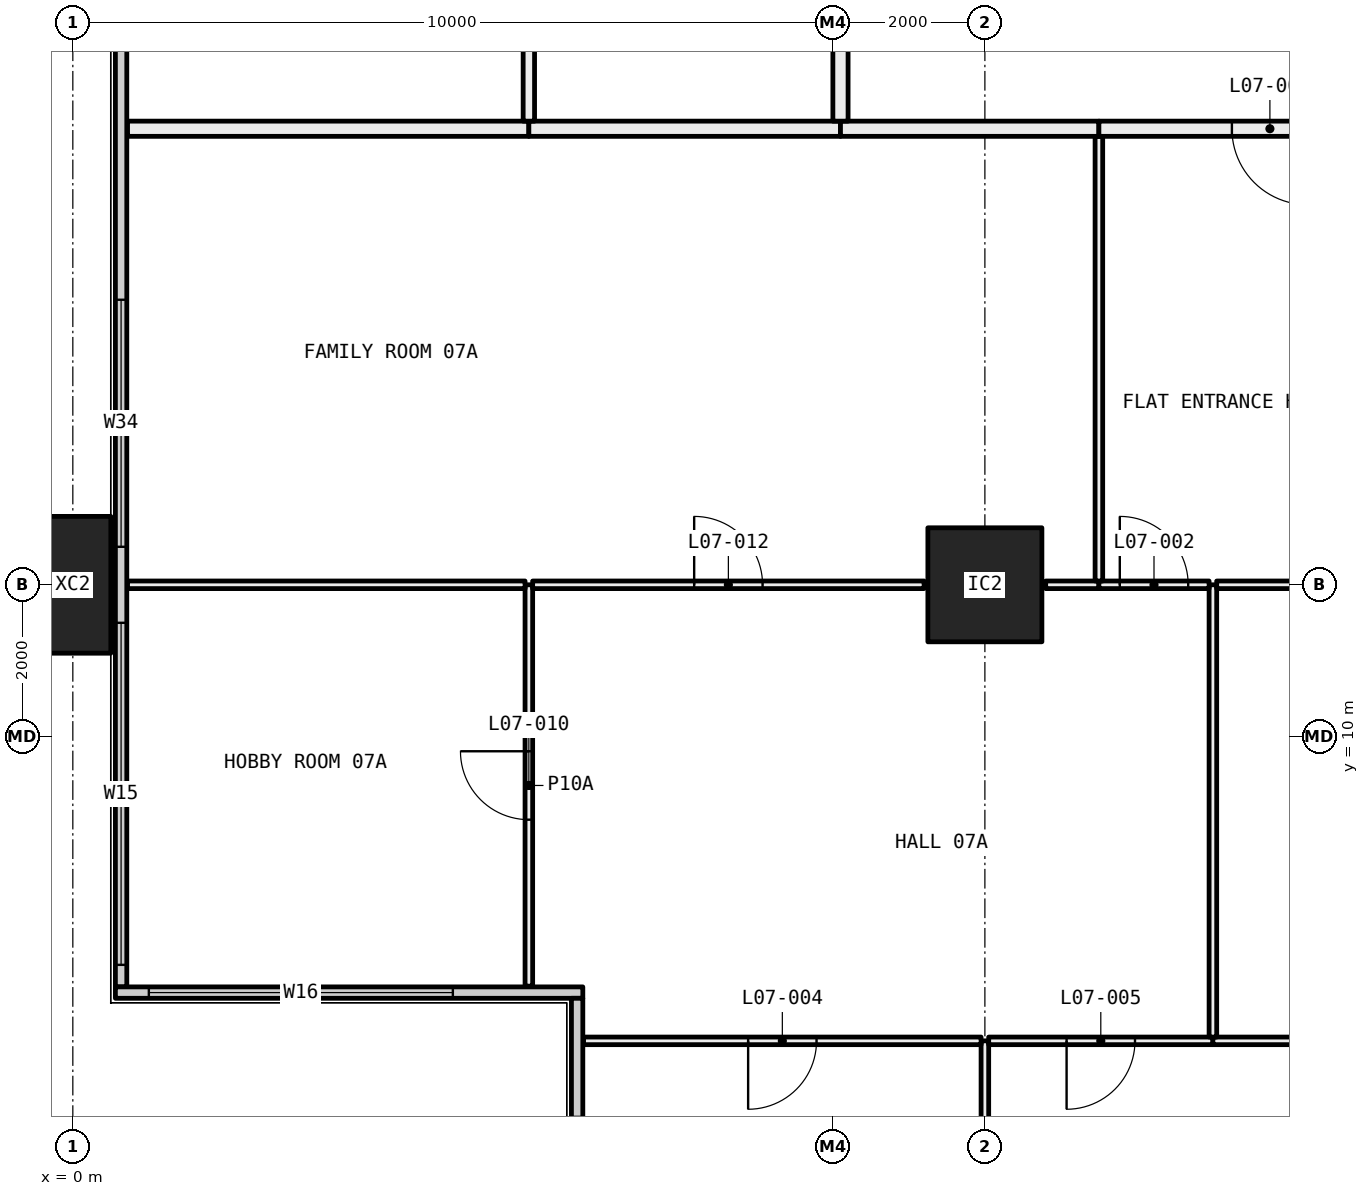
"""IFC4 building model, lengths in metres.
Left out: names, types, materials, properties, quantities, classifications, styles, units other than length and angle.
Written with IfcOpenShell. Run it as: python <this file> out.ifc"""

import sys

from ifc_helpers import new_model, si_unit, direction, frame, frame_2d, origin, origin_2d, place, context, subcontext, project, spatial, rectangle, hollow_rectangle, extrude, element, fill, save


model = new_model("IFC4")
c1 = context("Model", 3, precision=1e-05, world=origin(), true_north=direction((0.0, 1.0)))
c2 = subcontext(c1, "Body", "Model", "MODEL_VIEW")
j1 = project(units=[si_unit("LENGTHUNIT", "METRE"), si_unit("PLANEANGLEUNIT", "RADIAN")], contexts=[c1])
p1 = place(None, origin())
s1 = spatial("IfcSite", under=j1, at=p1, CompositionType="ELEMENT")
p2 = place(p1, origin())
s2 = spatial("IfcBuilding", under=s1, at=p2, CompositionType="ELEMENT")
p3 = place(p2, frame((0.0, 0.0, 36.9)))
s3 = spatial("IfcBuildingStorey", under=s2, at=p3, CompositionType="ELEMENT", Elevation=36.9)
p4 = place(p3, frame((0.0, 12.0, -0.4), z_axis=(0.0, 0.0, 1.0), x_axis=(0.0, 1.0, 0.0)))
e1 = element("IfcColumn", 1, at=p4, inside=s3, PredefinedType="COLUMN", context=c2, shape_type="SweptSolid", body=[
    extrude(hollow_rectangle(XDim=1.8, YDim=1.0, WallThickness=0.07, at=origin_2d()), origin(), (0.0, 0.0, 1.0), 3.45),
])
p5 = place(p3, frame((12.0, 12.0, 0.0), z_axis=(0.0, 0.0, 1.0), x_axis=(1.0, 0.0, 0.0)))
e2 = element("IfcColumn", 2, at=p5, inside=s3, PredefinedType="COLUMN", context=c2, shape_type="SweptSolid", body=[
    extrude(hollow_rectangle(XDim=1.5, YDim=1.5, WallThickness=0.065, at=origin_2d()), origin(), (0.0, 0.0, 1.0), 3.05),
])
p6 = place(p3, frame((0.635, 6.71, 0.0), z_axis=(0.0, 0.0, 1.0), x_axis=(0.0, 1.0, 0.0)))
e3 = element("IfcWall", 3, at=p6, inside=s3, PredefinedType="ELEMENTEDWALL", context=c2, shape_type="SweptSolid", body=[
    extrude(rectangle(XDim=34.58, YDim=0.15, at=frame_2d((17.29, 0.0))), origin(), (0.0, 0.0, 1.0), 3.05),
])
p7 = place(p6, frame((0.29, 0.0, 0.45)))
e4 = element("IfcOpeningElement", 4, at=p7, cuts=e3, PredefinedType="OPENING", context=c2, shape_type="SweptSolid", body=[
    extrude(rectangle(XDim=4.5, YDim=2.55, at=frame_2d((2.25, 1.275))), frame((0.0, 0.085, 0.0), z_axis=(0.0, -1.0, 0.0), x_axis=(1.0, 0.0, 0.0)), (0.0, 0.0, 1.0), 0.17),
])
p8 = place(p6, frame((5.79, 0.0, 0.45)))
e5 = element("IfcOpeningElement", 5, at=p8, cuts=e3, PredefinedType="OPENING", context=c2, shape_type="SweptSolid", body=[
    extrude(rectangle(XDim=3.25, YDim=2.55, at=frame_2d((1.625, 1.275))), frame((0.0, 0.085, 0.0), z_axis=(0.0, -1.0, 0.0), x_axis=(1.0, 0.0, 0.0)), (0.0, 0.0, 1.0), 0.17),
])
p9 = place(p6, frame((13.54, 0.0, 0.45)))
e6 = element("IfcOpeningElement", 6, at=p9, cuts=e3, PredefinedType="OPENING", context=c2, shape_type="SweptSolid", body=[
    extrude(rectangle(XDim=3.25, YDim=2.55, at=frame_2d((1.625, 1.275))), frame((0.0, 0.085, 0.0), z_axis=(0.0, -1.0, 0.0), x_axis=(1.0, 0.0, 0.0)), (0.0, 0.0, 1.0), 0.17),
])
p10 = place(p6, frame((17.79, 0.0, 0.45)))
e7 = element("IfcOpeningElement", 7, at=p10, cuts=e3, PredefinedType="OPENING", context=c2, shape_type="SweptSolid", body=[
    extrude(rectangle(XDim=3.25, YDim=2.55, at=frame_2d((1.625, 1.275))), frame((0.0, 0.085, 0.0), z_axis=(0.0, -1.0, 0.0), x_axis=(1.0, 0.0, 0.0)), (0.0, 0.0, 1.0), 0.17),
])
p11 = place(p6, frame((26.79, 0.0, 0.45)))
e8 = element("IfcOpeningElement", 8, at=p11, cuts=e3, PredefinedType="OPENING", context=c2, shape_type="SweptSolid", body=[
    extrude(rectangle(XDim=2.0, YDim=2.55, at=frame_2d((1.0, 1.275))), frame((0.0, 0.085, 0.0), z_axis=(0.0, -1.0, 0.0), x_axis=(1.0, 0.0, 0.0)), (0.0, 0.0, 1.0), 0.17),
])
p12 = place(p6, frame((29.79, 0.0, 0.45)))
e9 = element("IfcOpeningElement", 9, at=p12, cuts=e3, PredefinedType="OPENING", context=c2, shape_type="SweptSolid", body=[
    extrude(rectangle(XDim=4.5, YDim=2.55, at=frame_2d((2.25, 1.275))), frame((0.0, 0.085, 0.0), z_axis=(0.0, -1.0, 0.0), x_axis=(1.0, 0.0, 0.0)), (0.0, 0.0, 1.0), 0.17),
])
p13 = place(p3, frame((0.56, 6.635, 0.0), z_axis=(0.0, 0.0, 1.0), x_axis=(1.0, 0.0, 0.0)))
e10 = element("IfcWall", 10, at=p13, inside=s3, PredefinedType="ELEMENTEDWALL", context=c2, shape_type="SweptSolid", body=[
    extrude(rectangle(XDim=6.15, YDim=0.15, at=frame_2d((3.075, 0.0))), origin(), (0.0, 0.0, 1.0), 3.05),
])
p14 = place(p13, frame((0.44, 0.0, 0.45)))
e11 = element("IfcOpeningElement", 11, at=p14, cuts=e10, PredefinedType="OPENING", context=c2, shape_type="SweptSolid", body=[
    extrude(rectangle(XDim=4.0, YDim=2.55, at=frame_2d((2.0, 1.275))), frame((0.0, 0.085, 0.0), z_axis=(0.0, -1.0, 0.0), x_axis=(1.0, 0.0, 0.0)), (0.0, 0.0, 1.0), 0.17),
])
p15 = place(p3, frame((6.635, 0.71, 0.0), z_axis=(0.0, 0.0, 1.0), x_axis=(0.0, 1.0, 0.0)))
e12 = element("IfcWall", 12, at=p15, inside=s3, PredefinedType="ELEMENTEDWALL", context=c2, shape_type="SweptSolid", body=[
    extrude(rectangle(XDim=5.85, YDim=0.15, at=frame_2d((2.925, 0.0))), origin(), (0.0, 0.0, 1.0), 3.05),
])
p16 = place(p15, frame((0.29, 0.0, 0.45)))
e13 = element("IfcOpeningElement", 13, at=p16, cuts=e12, PredefinedType="OPENING", context=c2, shape_type="SweptSolid", body=[
    extrude(rectangle(XDim=4.0, YDim=2.55, at=frame_2d((2.0, 1.275))), frame((0.0, 0.085, 0.0), z_axis=(0.0, -1.0, 0.0), x_axis=(1.0, 0.0, 0.0)), (0.0, 0.0, 1.0), 0.17),
])
p17 = place(p3, frame((12.0, 0.72, 0.0), z_axis=(0.0, 0.0, 1.0), x_axis=(0.0, 1.0, 0.0)))
e14 = element("IfcWall", 14, at=p17, inside=s3, PredefinedType="PARTITIONING", context=c2, shape_type="SweptSolid", body=[
    extrude(rectangle(XDim=5.28, YDim=0.1, at=frame_2d((2.64, 0.0))), origin(), (0.0, 0.0, 1.0), 2.45),
])
p18 = place(p3, frame((11.95, 6.0, 0.0), z_axis=(0.0, 0.0, 1.0), x_axis=(-1.0, 0.0, 0.0)))
e15 = element("IfcWall", 15, at=p18, inside=s3, PredefinedType="PARTITIONING", context=c2, shape_type="SweptSolid", body=[
    extrude(rectangle(XDim=5.23, YDim=0.1, at=frame_2d((2.615, 0.0))), origin(), (0.0, 0.0, 1.0), 2.45),
])
p19 = place(p18, frame((2.165, 0.0, 0.0)))
e16 = element("IfcOpeningElement", 16, at=p19, cuts=e15, PredefinedType="OPENING", context=c2, shape_type="SweptSolid", body=[
    extrude(rectangle(XDim=0.9, YDim=2.1, at=frame_2d((0.45, 1.05))), frame((0.0, 0.06, 0.0), z_axis=(0.0, -1.0, 0.0), x_axis=(1.0, 0.0, 0.0)), (0.0, 0.0, 1.0), 0.12),
])
p20 = place(p3, frame((15.0, 6.0, 0.0), z_axis=(0.0, 0.0, 1.0), x_axis=(-1.0, 0.0, 0.0)))
e17 = element("IfcWall", 17, at=p20, inside=s3, PredefinedType="PARTITIONING", context=c2, shape_type="SweptSolid", body=[
    extrude(rectangle(XDim=2.95, YDim=0.1, at=frame_2d((1.475, 0.0))), origin(), (0.0, 0.0, 1.0), 2.45),
])
p21 = place(p20, frame((1.025, 0.0, 0.0)))
e18 = element("IfcOpeningElement", 18, at=p21, cuts=e17, PredefinedType="OPENING", context=c2, shape_type="SweptSolid", body=[
    extrude(rectangle(XDim=0.9, YDim=2.1, at=frame_2d((0.45, 1.05))), frame((0.0, 0.06, 0.0), z_axis=(0.0, -1.0, 0.0), x_axis=(1.0, 0.0, 0.0)), (0.0, 0.0, 1.0), 0.12),
])
p22 = place(p3, frame((17.95, 6.0, 0.0), z_axis=(0.0, 0.0, 1.0), x_axis=(-1.0, 0.0, 0.0)))
e19 = element("IfcWall", 19, at=p22, inside=s3, PredefinedType="PARTITIONING", context=c2, shape_type="SweptSolid", body=[
    extrude(rectangle(XDim=2.95, YDim=0.1, at=frame_2d((1.475, 0.0))), origin(), (0.0, 0.0, 1.0), 3.05),
])
p23 = place(p3, frame((6.0, 6.72, 0.0), z_axis=(0.0, 0.0, 1.0), x_axis=(0.0, 1.0, 0.0)))
e20 = element("IfcWall", 20, at=p23, inside=s3, PredefinedType="PARTITIONING", context=c2, shape_type="SweptSolid", body=[
    extrude(rectangle(XDim=5.28, YDim=0.1, at=frame_2d((2.64, 0.0))), origin(), (0.0, 0.0, 1.0), 2.45),
])
p24 = place(p23, frame((2.19, 0.0, 0.0)))
e21 = element("IfcOpeningElement", 21, at=p24, cuts=e20, PredefinedType="OPENING", context=c2, shape_type="SweptSolid", body=[
    extrude(rectangle(XDim=0.9, YDim=2.1, at=frame_2d((0.45, 1.05))), frame((0.0, 0.06, 0.0), z_axis=(0.0, -1.0, 0.0), x_axis=(1.0, 0.0, 0.0)), (0.0, 0.0, 1.0), 0.12),
])
p25 = place(p3, frame((5.95, 12.0, 0.0), z_axis=(0.0, 0.0, 1.0), x_axis=(-1.0, 0.0, 0.0)))
e22 = element("IfcWall", 22, at=p25, inside=s3, PredefinedType="PARTITIONING", context=c2, shape_type="SweptSolid", body=[
    extrude(rectangle(XDim=5.23, YDim=0.1, at=frame_2d((2.615, 0.0))), origin(), (0.0, 0.0, 1.0), 2.45),
])
p26 = place(p3, frame((15.0, 6.05, 0.0), z_axis=(0.0, 0.0, 1.0), x_axis=(0.0, 1.0, 0.0)))
e23 = element("IfcWall", 23, at=p26, inside=s3, PredefinedType="PARTITIONING", context=c2, shape_type="SweptSolid", body=[
    extrude(rectangle(XDim=5.95, YDim=0.1, at=frame_2d((2.975, 0.0))), origin(), (0.0, 0.0, 1.0), 2.45),
])
p27 = place(p3, frame((11.2, 12.0, 0.0), z_axis=(0.0, 0.0, 1.0), x_axis=(-1.0, 0.0, 0.0)))
e24 = element("IfcWall", 24, at=p27, inside=s3, PredefinedType="PARTITIONING", context=c2, shape_type="SweptSolid", body=[
    extrude(rectangle(XDim=5.15, YDim=0.1, at=frame_2d((2.575, 0.0))), origin(), (0.0, 0.0, 1.0), 2.45),
])
p28 = place(p27, frame((2.125, 0.0, 0.0)))
e25 = element("IfcOpeningElement", 25, at=p28, cuts=e24, PredefinedType="OPENING", context=c2, shape_type="SweptSolid", body=[
    extrude(rectangle(XDim=0.9, YDim=2.1, at=frame_2d((0.45, 1.05))), frame((0.0, 0.06, 0.0), z_axis=(0.0, -1.0, 0.0), x_axis=(1.0, 0.0, 0.0)), (0.0, 0.0, 1.0), 0.12),
])
p29 = place(p3, frame((13.5, 12.0, 0.0), z_axis=(0.0, 0.0, 1.0), x_axis=(-1.0, 0.0, 0.0)))
e26 = element("IfcWall", 26, at=p29, inside=s3, PredefinedType="PARTITIONING", context=c2, shape_type="SweptSolid", body=[
    extrude(rectangle(XDim=0.7, YDim=0.1, at=frame_2d((0.35, 0.0))), origin(), (0.0, 0.0, 1.0), 2.45),
])
p30 = place(p3, frame((14.95, 12.0, 0.0), z_axis=(0.0, 0.0, 1.0), x_axis=(-1.0, 0.0, 0.0)))
e27 = element("IfcWall", 27, at=p30, inside=s3, PredefinedType="PARTITIONING", context=c2, shape_type="SweptSolid", body=[
    extrude(rectangle(XDim=1.45, YDim=0.1, at=frame_2d((0.725, 0.0))), origin(), (0.0, 0.0, 1.0), 2.45),
])
p31 = place(p30, frame((0.275, 0.0, 0.0)))
e28 = element("IfcOpeningElement", 28, at=p31, cuts=e27, PredefinedType="OPENING", context=c2, shape_type="SweptSolid", body=[
    extrude(rectangle(XDim=0.9, YDim=2.1, at=frame_2d((0.45, 1.05))), frame((0.0, 0.06, 0.0), z_axis=(0.0, -1.0, 0.0), x_axis=(1.0, 0.0, 0.0)), (0.0, 0.0, 1.0), 0.12),
])
p32 = place(p3, frame((18.0, 12.0, 0.0), z_axis=(0.0, 0.0, 1.0), x_axis=(-1.0, 0.0, 0.0)))
e29 = element("IfcWall", 29, at=p32, inside=s3, PredefinedType="PARTITIONING", context=c2, shape_type="SweptSolid", body=[
    extrude(rectangle(XDim=2.95, YDim=0.1, at=frame_2d((1.475, 0.0))), origin(), (0.0, 0.0, 1.0), 2.45),
])
p33 = place(p32, frame((1.025, 0.0, 0.0)))
e30 = element("IfcOpeningElement", 30, at=p33, cuts=e29, PredefinedType="OPENING", context=c2, shape_type="SweptSolid", body=[
    extrude(rectangle(XDim=0.9, YDim=2.1, at=frame_2d((0.45, 1.05))), frame((0.0, 0.06, 0.0), z_axis=(0.0, -1.0, 0.0), x_axis=(1.0, 0.0, 0.0)), (0.0, 0.0, 1.0), 0.12),
])
p34 = place(p3, frame((13.5, 12.05, 0.0), z_axis=(0.0, 0.0, 1.0), x_axis=(0.0, 1.0, 0.0)))
e31 = element("IfcWall", 31, at=p34, inside=s3, PredefinedType="PARTITIONING", context=c2, shape_type="SweptSolid", body=[
    extrude(rectangle(XDim=5.85, YDim=0.1, at=frame_2d((2.925, 0.0))), origin(), (0.0, 0.0, 1.0), 2.45),
])
p35 = place(p3, frame((6.0, 18.0, 0.0), z_axis=(0.0, 0.0, 1.0), x_axis=(-1.0, 0.0, 0.0)))
e32 = element("IfcWall", 32, at=p35, inside=s3, PredefinedType="PARTITIONING", context=c2, shape_type="SweptSolid", body=[
    extrude(rectangle(XDim=5.28, YDim=0.2, at=frame_2d((2.64, 0.0))), origin(), (0.0, 0.0, 1.0), 3.05),
])
p36 = place(p3, frame((10.1, 18.0, 0.0), z_axis=(0.0, 0.0, 1.0), x_axis=(-1.0, 0.0, 0.0)))
e33 = element("IfcWall", 33, at=p36, inside=s3, PredefinedType="PARTITIONING", context=c2, shape_type="SweptSolid", body=[
    extrude(rectangle(XDim=4.1, YDim=0.2, at=frame_2d((2.05, 0.0))), origin(), (0.0, 0.0, 1.0), 3.05),
])
p37 = place(p3, frame((13.5, 18.0, 0.0), z_axis=(0.0, 0.0, 1.0), x_axis=(-1.0, 0.0, 0.0)))
e34 = element("IfcWall", 34, at=p37, inside=s3, PredefinedType="PARTITIONING", context=c2, shape_type="SweptSolid", body=[
    extrude(rectangle(XDim=3.4, YDim=0.2, at=frame_2d((1.7, 0.0))), origin(), (0.0, 0.0, 1.0), 3.05),
])
p38 = place(p3, frame((18.0, 18.0, 0.0), z_axis=(0.0, 0.0, 1.0), x_axis=(-1.0, 0.0, 0.0)))
e35 = element("IfcWall", 35, at=p38, inside=s3, PredefinedType="PARTITIONING", context=c2, shape_type="SweptSolid", body=[
    extrude(rectangle(XDim=4.5, YDim=0.2, at=frame_2d((2.25, 0.0))), origin(), (0.0, 0.0, 1.0), 3.05),
])
p39 = place(p38, frame((1.75, 0.0, 0.0)))
e36 = element("IfcOpeningElement", 36, at=p39, cuts=e35, PredefinedType="OPENING", context=c2, shape_type="SweptSolid", body=[
    extrude(rectangle(XDim=1.0, YDim=2.1, at=frame_2d((0.5, 1.05))), frame((0.0, 0.11, 0.0), z_axis=(0.0, -1.0, 0.0), x_axis=(1.0, 0.0, 0.0)), (0.0, 0.0, 1.0), 0.22),
])
p40 = place(p3, frame((6.0, 18.1, 0.0), z_axis=(0.0, 0.0, 1.0), x_axis=(0.0, 1.0, 0.0)))
e37 = element("IfcWall", 37, at=p40, inside=s3, PredefinedType="PARTITIONING", context=c2, shape_type="SweptSolid", body=[
    extrude(rectangle(XDim=4.4, YDim=0.15, at=frame_2d((2.2, 0.0))), origin(), (0.0, 0.0, 1.0), 3.05),
])
p41 = place(p40, frame((1.75, 0.0, 0.0)))
e38 = element("IfcOpeningElement", 38, at=p41, cuts=e37, PredefinedType="OPENING", context=c2, shape_type="SweptSolid", body=[
    extrude(rectangle(XDim=0.9, YDim=2.1, at=frame_2d((0.45, 1.05))), frame((0.0, 0.085, 0.0), z_axis=(0.0, -1.0, 0.0), x_axis=(1.0, 0.0, 0.0)), (0.0, 0.0, 1.0), 0.17),
])
p42 = place(p3, frame((10.1, 18.1, 0.0), z_axis=(0.0, 0.0, 1.0), x_axis=(0.0, 1.0, 0.0)))
e39 = element("IfcWall", 39, at=p42, inside=s3, PredefinedType="PARTITIONING", context=c2, shape_type="SweptSolid", body=[
    extrude(rectangle(XDim=4.4, YDim=0.2, at=frame_2d((2.2, 0.0))), origin(), (0.0, 0.0, 1.0), 3.05),
])
p43 = place(p7, origin())
e40 = element("IfcWindow", 40, at=p43, inside=s3, PartitioningType="SINGLE_PANEL", PredefinedType="WINDOW", context=c2, shape_type="SweptSolid", body=[
    extrude(rectangle(XDim=4.5, YDim=2.55, at=frame_2d((2.25, 1.275))), frame((0.0, 0.03, 0.0), z_axis=(0.0, -1.0, 0.0), x_axis=(1.0, 0.0, 0.0)), (0.0, 0.0, 1.0), 0.06),
])
fill(e4, e40)
p44 = place(p8, origin())
e41 = element("IfcWindow", 41, at=p44, inside=s3, PartitioningType="SINGLE_PANEL", PredefinedType="WINDOW", context=c2, shape_type="SweptSolid", body=[
    extrude(rectangle(XDim=3.25, YDim=2.55, at=frame_2d((1.625, 1.275))), frame((0.0, 0.03, 0.0), z_axis=(0.0, -1.0, 0.0), x_axis=(1.0, 0.0, 0.0)), (0.0, 0.0, 1.0), 0.06),
])
fill(e5, e41)
p45 = place(p14, origin())
e42 = element("IfcWindow", 42, at=p45, inside=s3, PartitioningType="SINGLE_PANEL", PredefinedType="WINDOW", context=c2, shape_type="SweptSolid", body=[
    extrude(rectangle(XDim=4.0, YDim=2.55, at=frame_2d((2.0, 1.275))), frame((0.0, 0.03, 0.0), z_axis=(0.0, -1.0, 0.0), x_axis=(1.0, 0.0, 0.0)), (0.0, 0.0, 1.0), 0.06),
])
fill(e11, e42)
p46 = place(p39, origin())
e43 = element("IfcDoor", 43, at=p46, inside=s3, OperationType="SINGLE_SWING_RIGHT", PredefinedType="DOOR", context=c2, shape_type="SweptSolid", body=[
    extrude(rectangle(XDim=1.0, YDim=2.1, at=frame_2d((0.5, 1.05))), frame((0.0, 0.025, 0.0), z_axis=(0.0, -1.0, 0.0), x_axis=(1.0, 0.0, 0.0)), (0.0, 0.0, 1.0), 0.05),
])
fill(e36, e43)
p47 = place(p31, frame((0.9, 0.0, 0.0), x_axis=(-1.0, 0.0, 0.0)))
e44 = element("IfcDoor", 44, at=p47, inside=s3, OperationType="SINGLE_SWING_RIGHT", PredefinedType="DOOR", context=c2, shape_type="SweptSolid", body=[
    extrude(rectangle(XDim=0.9, YDim=2.1, at=frame_2d((0.45, 1.05))), frame((0.0, 0.025, 0.0), z_axis=(0.0, -1.0, 0.0), x_axis=(1.0, 0.0, 0.0)), (0.0, 0.0, 1.0), 0.05),
])
fill(e28, e44)
p48 = place(p19, origin())
e45 = element("IfcDoor", 45, at=p48, inside=s3, OperationType="SINGLE_SWING_LEFT", PredefinedType="DOOR", context=c2, shape_type="SweptSolid", body=[
    extrude(rectangle(XDim=0.9, YDim=2.1, at=frame_2d((0.45, 1.05))), frame((0.0, 0.025, 0.0), z_axis=(0.0, -1.0, 0.0), x_axis=(1.0, 0.0, 0.0)), (0.0, 0.0, 1.0), 0.05),
])
fill(e16, e45)
p49 = place(p21, origin())
e46 = element("IfcDoor", 46, at=p49, inside=s3, OperationType="SINGLE_SWING_LEFT", PredefinedType="DOOR", context=c2, shape_type="SweptSolid", body=[
    extrude(rectangle(XDim=0.9, YDim=2.1, at=frame_2d((0.45, 1.05))), frame((0.0, 0.025, 0.0), z_axis=(0.0, -1.0, 0.0), x_axis=(1.0, 0.0, 0.0)), (0.0, 0.0, 1.0), 0.05),
])
fill(e18, e46)
p50 = place(p24, origin())
e47 = element("IfcDoor", 47, at=p50, inside=s3, OperationType="SINGLE_SWING_LEFT", PredefinedType="DOOR", context=c2, shape_type="SweptSolid", body=[
    extrude(rectangle(XDim=0.9, YDim=2.1, at=frame_2d((0.45, 1.05))), frame((0.0, 0.025, 0.0), z_axis=(0.0, -1.0, 0.0), x_axis=(1.0, 0.0, 0.0)), (0.0, 0.0, 1.0), 0.05),
])
fill(e21, e47)
p51 = place(p28, frame((0.9, 0.0, 0.0), x_axis=(-1.0, 0.0, 0.0)))
e48 = element("IfcDoor", 48, at=p51, inside=s3, OperationType="SINGLE_SWING_RIGHT", PredefinedType="DOOR", context=c2, shape_type="SweptSolid", body=[
    extrude(rectangle(XDim=0.9, YDim=2.1, at=frame_2d((0.45, 1.05))), frame((0.0, 0.025, 0.0), z_axis=(0.0, -1.0, 0.0), x_axis=(1.0, 0.0, 0.0)), (0.0, 0.0, 1.0), 0.05),
])
fill(e25, e48)
save(model, sys.argv[1])
